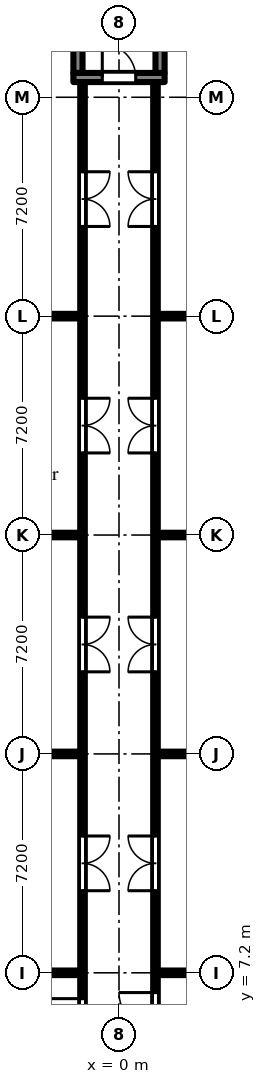
"""IFC4 building model, lengths in metres.
Left out: names, types, materials, properties, quantities, classifications, styles, units other than length and angle.
Written with IfcOpenShell. Run it as: python <this file> out.ifc"""

import sys

from ifc_helpers import new_model, si_unit, direction, frame, frame_2d, origin, place, context, subcontext, project, spatial, polyline, rectangle, outline, extrude, element, fill, save


model = new_model("IFC4")
c1 = context("Model", 3, precision=1e-05, world=origin(), true_north=direction((0.0, 1.0)))
c2 = subcontext(c1, "Body", "Model", "MODEL_VIEW")
j1 = project(units=[si_unit("LENGTHUNIT", "METRE"), si_unit("PLANEANGLEUNIT", "RADIAN")], contexts=[c1])
p1 = place(None, origin())
s1 = spatial("IfcSite", under=j1, at=p1, CompositionType="ELEMENT")
p2 = place(p1, origin())
s2 = spatial("IfcBuilding", under=s1, at=p2, CompositionType="ELEMENT")
p3 = place(p2, frame((0.0, 0.0, 62.7)))
s3 = spatial("IfcBuildingStorey", under=s2, at=p3, CompositionType="ELEMENT", Elevation=62.7)
p4 = place(p3, frame((-1.5, 36.65, 0.0), z_axis=(0.0, 0.0, 1.0), x_axis=(1.0, 0.0, 0.0)))
e1 = element("IfcWall", 1, at=p4, inside=s3, PredefinedType="SHEAR", context=c2, shape_type="SweptSolid", body=[
    extrude(rectangle(XDim=3.0, YDim=0.3, at=frame_2d((1.5, 0.0))), origin(), (0.0, 0.0, 1.0), 3.775),
])
p5 = place(p4, frame((0.95, 0.0, 0.0)))
e2 = element("IfcOpeningElement", 2, at=p5, cuts=e1, PredefinedType="OPENING", context=c2, shape_type="SweptSolid", body=[
    extrude(rectangle(XDim=1.1, YDim=2.1, at=frame_2d((0.55, 1.05))), frame((0.0, 0.16, 0.0), z_axis=(0.0, -1.0, 0.0), x_axis=(1.0, 0.0, 0.0)), (0.0, 0.0, 1.0), 0.32),
])
for number, where, z_axis, x_axis in (
    (3, (-1.35, 36.8, 0.0), (0.0, 0.0, 1.0), (0.0, 1.0, 0.0)),
    (4, (1.35, 36.8, 0.0), (0.0, 0.0, 1.0), (0.0, 1.0, 0.0)),
):
    element("IfcWall", number, at=place(p3, frame(where, z_axis=z_axis, x_axis=x_axis)), inside=s3, PredefinedType="SHEAR", context=c2, shape_type="SweptSolid", body=[
        extrude(rectangle(XDim=5.8, YDim=0.3, at=frame_2d((2.9, 0.0))), origin(), (0.0, 0.0, 1.0), 3.775),
    ])
p6 = place(p3, frame((-6.9, 21.6, 0.0), z_axis=(0.0, 0.0, 1.0), x_axis=(1.0, 0.0, 0.0)))
e5 = element("IfcWall", 5, at=p6, inside=s3, PredefinedType="PARTITIONING", context=c2, shape_type="SweptSolid", body=[
    extrude(rectangle(XDim=5.625, YDim=0.15, at=frame_2d((2.812, 0.0))), origin(), (0.0, 0.0, 1.0), 2.175),
])
p7 = place(p3, frame((-6.9, 28.8, 0.0), z_axis=(0.0, 0.0, 1.0), x_axis=(1.0, 0.0, 0.0)))
e6 = element("IfcWall", 6, at=p7, inside=s3, PredefinedType="PARTITIONING", context=c2, shape_type="SweptSolid", body=[
    extrude(rectangle(XDim=5.625, YDim=0.15, at=frame_2d((2.812, 0.0))), origin(), (0.0, 0.0, 1.0), 3.775),
])
p8 = place(p3, frame((-1.2, 1.125, 0.0), z_axis=(0.0, 0.0, 1.0), x_axis=(0.0, 1.0, 0.0)))
e7 = element("IfcWall", 7, at=p8, inside=s3, PredefinedType="PARTITIONING", context=c2, shape_type="SweptSolid", body=[
    extrude(outline(polyline([(0.0, 0.0), (35.375, 0.0), (35.375, 3.775), (22.877, 3.775), (22.875, 3.4), (22.075, 3.4), (22.073, 3.775), (0.0, 3.775), (0.0, 0.0)])), frame((0.0, 0.075, 0.0), z_axis=(0.0, -1.0, 0.0), x_axis=(1.0, 0.0, 0.0)), (0.0, 0.0, 1.0), 0.15),
])
p9 = place(p8, frame((4.025, 0.0, 0.0)))
e8 = element("IfcOpeningElement", 8, at=p9, cuts=e7, PredefinedType="OPENING", context=c2, shape_type="SweptSolid", body=[
    extrude(rectangle(XDim=1.2, YDim=2.1, at=frame_2d((0.6, 1.05))), frame((0.0, 0.085, 0.0), z_axis=(0.0, -1.0, 0.0), x_axis=(1.0, 0.0, 0.0)), (0.0, 0.0, 1.0), 0.17),
])
p10 = place(p8, frame((8.775, 0.0, 0.0)))
e9 = element("IfcOpeningElement", 9, at=p10, cuts=e7, PredefinedType="OPENING", context=c2, shape_type="SweptSolid", body=[
    extrude(rectangle(XDim=1.8, YDim=2.1, at=frame_2d((0.9, 1.05))), frame((0.0, 0.085, 0.0), z_axis=(0.0, -1.0, 0.0), x_axis=(1.0, 0.0, 0.0)), (0.0, 0.0, 1.0), 0.17),
])
p11 = place(p8, frame((15.975, 0.0, 0.0)))
e10 = element("IfcOpeningElement", 10, at=p11, cuts=e7, PredefinedType="OPENING", context=c2, shape_type="SweptSolid", body=[
    extrude(rectangle(XDim=1.8, YDim=2.1, at=frame_2d((0.9, 1.05))), frame((0.0, 0.085, 0.0), z_axis=(0.0, -1.0, 0.0), x_axis=(1.0, 0.0, 0.0)), (0.0, 0.0, 1.0), 0.17),
])
p12 = place(p8, frame((23.175, 0.0, 0.0)))
e11 = element("IfcOpeningElement", 11, at=p12, cuts=e7, PredefinedType="OPENING", context=c2, shape_type="SweptSolid", body=[
    extrude(rectangle(XDim=1.8, YDim=2.1, at=frame_2d((0.9, 1.05))), frame((0.0, 0.085, 0.0), z_axis=(0.0, -1.0, 0.0), x_axis=(1.0, 0.0, 0.0)), (0.0, 0.0, 1.0), 0.17),
])
p13 = place(p8, frame((30.625, 0.0, 0.0)))
e12 = element("IfcOpeningElement", 12, at=p13, cuts=e7, PredefinedType="OPENING", context=c2, shape_type="SweptSolid", body=[
    extrude(rectangle(XDim=1.8, YDim=2.1, at=frame_2d((0.9, 1.05))), frame((0.0, 0.085, 0.0), z_axis=(0.0, -1.0, 0.0), x_axis=(1.0, 0.0, 0.0)), (0.0, 0.0, 1.0), 0.17),
])
p14 = place(p3, frame((1.2, 1.125, 0.0), z_axis=(0.0, 0.0, 1.0), x_axis=(0.0, 1.0, 0.0)))
e13 = element("IfcWall", 13, at=p14, inside=s3, PredefinedType="PARTITIONING", context=c2, shape_type="SweptSolid", body=[
    extrude(outline(polyline([(0.0, 0.0), (35.375, 0.0), (35.375, 3.775), (22.877, 3.775), (22.875, 3.4), (22.075, 3.4), (22.073, 3.775), (0.0, 3.775), (0.0, 0.0)])), frame((0.0, 0.075, 0.0), z_axis=(0.0, -1.0, 0.0), x_axis=(1.0, 0.0, 0.0)), (0.0, 0.0, 1.0), 0.15),
])
p15 = place(p14, frame((0.175, 0.0, 0.0)))
e14 = element("IfcOpeningElement", 14, at=p15, cuts=e13, PredefinedType="OPENING", context=c2, shape_type="SweptSolid", body=[
    extrude(rectangle(XDim=0.9, YDim=2.1, at=frame_2d((0.45, 1.05))), frame((0.0, 0.085, 0.0), z_axis=(0.0, -1.0, 0.0), x_axis=(1.0, 0.0, 0.0)), (0.0, 0.0, 1.0), 0.17),
])
p16 = place(p14, frame((4.225, 0.0, 0.0)))
e15 = element("IfcOpeningElement", 15, at=p16, cuts=e13, PredefinedType="OPENING", context=c2, shape_type="SweptSolid", body=[
    extrude(rectangle(XDim=1.2, YDim=2.1, at=frame_2d((0.6, 1.05))), frame((0.0, 0.085, 0.0), z_axis=(0.0, -1.0, 0.0), x_axis=(1.0, 0.0, 0.0)), (0.0, 0.0, 1.0), 0.17),
])
p17 = place(p14, frame((8.775, 0.0, 0.0)))
e16 = element("IfcOpeningElement", 16, at=p17, cuts=e13, PredefinedType="OPENING", context=c2, shape_type="SweptSolid", body=[
    extrude(rectangle(XDim=1.8, YDim=2.1, at=frame_2d((0.9, 1.05))), frame((0.0, 0.085, 0.0), z_axis=(0.0, -1.0, 0.0), x_axis=(1.0, 0.0, 0.0)), (0.0, 0.0, 1.0), 0.17),
])
p18 = place(p14, frame((15.975, 0.0, 0.0)))
e17 = element("IfcOpeningElement", 17, at=p18, cuts=e13, PredefinedType="OPENING", context=c2, shape_type="SweptSolid", body=[
    extrude(rectangle(XDim=1.8, YDim=2.1, at=frame_2d((0.9, 1.05))), frame((0.0, 0.085, 0.0), z_axis=(0.0, -1.0, 0.0), x_axis=(1.0, 0.0, 0.0)), (0.0, 0.0, 1.0), 0.17),
])
p19 = place(p14, frame((23.175, 0.0, 0.0)))
e18 = element("IfcOpeningElement", 18, at=p19, cuts=e13, PredefinedType="OPENING", context=c2, shape_type="SweptSolid", body=[
    extrude(rectangle(XDim=1.8, YDim=2.1, at=frame_2d((0.9, 1.05))), frame((0.0, 0.085, 0.0), z_axis=(0.0, -1.0, 0.0), x_axis=(1.0, 0.0, 0.0)), (0.0, 0.0, 1.0), 0.17),
])
p20 = place(p14, frame((30.625, 0.0, 0.0)))
e19 = element("IfcOpeningElement", 19, at=p20, cuts=e13, PredefinedType="OPENING", context=c2, shape_type="SweptSolid", body=[
    extrude(rectangle(XDim=1.8, YDim=2.1, at=frame_2d((0.9, 1.05))), frame((0.0, 0.085, 0.0), z_axis=(0.0, -1.0, 0.0), x_axis=(1.0, 0.0, 0.0)), (0.0, 0.0, 1.0), 0.17),
])
for number, where, z_axis, x_axis in (
    (20, (1.275, 7.2, 0.0), (0.0, 0.0, 1.0), (1.0, 0.0, 0.0)),
    (21, (1.275, 14.4, 0.0), (0.0, 0.0, 1.0), (1.0, 0.0, 0.0)),
):
    element("IfcWall", number, at=place(p3, frame(where, z_axis=z_axis, x_axis=x_axis)), inside=s3, PredefinedType="PARTITIONING", context=c2, shape_type="SweptSolid", body=[
        extrude(rectangle(XDim=2.475, YDim=0.15, at=frame_2d((1.238, 0.0))), origin(), (0.0, 0.0, 1.0), 3.775),
    ])
p21 = place(p3, frame((1.275, 21.6, 0.0), z_axis=(0.0, 0.0, 1.0), x_axis=(1.0, 0.0, 0.0)))
e22 = element("IfcWall", 22, at=p21, inside=s3, PredefinedType="PARTITIONING", context=c2, shape_type="SweptSolid", body=[
    extrude(rectangle(XDim=5.625, YDim=0.15, at=frame_2d((2.812, 0.0))), origin(), (0.0, 0.0, 1.0), 2.175),
])
p22 = place(p3, frame((1.275, 28.8, 0.0), z_axis=(0.0, 0.0, 1.0), x_axis=(1.0, 0.0, 0.0)))
e23 = element("IfcWall", 23, at=p22, inside=s3, PredefinedType="PARTITIONING", context=c2, shape_type="SweptSolid", body=[
    extrude(rectangle(XDim=5.625, YDim=0.15, at=frame_2d((2.812, 0.0))), origin(), (0.0, 0.0, 1.0), 3.775),
])
for number, where, z_axis, x_axis in (
    (24, (-3.75, 7.2, 0.0), (0.0, 0.0, 1.0), (1.0, 0.0, 0.0)),
    (25, (-3.75, 14.4, 0.0), (0.0, 0.0, 1.0), (1.0, 0.0, 0.0)),
):
    element("IfcWall", number, at=place(p3, frame(where, z_axis=z_axis, x_axis=x_axis)), inside=s3, PredefinedType="PARTITIONING", context=c2, shape_type="SweptSolid", body=[
        extrude(rectangle(XDim=2.475, YDim=0.15, at=frame_2d((1.238, 0.0))), origin(), (0.0, 0.0, 1.0), 3.775),
    ])
p23 = place(p5, origin())
e26 = element("IfcDoor", 26, at=p23, inside=s3, OperationType="SINGLE_SWING_LEFT", PredefinedType="DOOR", context=c2, shape_type="SweptSolid", body=[
    extrude(rectangle(XDim=1.1, YDim=2.1, at=frame_2d((0.55, 1.05))), frame((0.0, 0.025, 0.0), z_axis=(0.0, -1.0, 0.0), x_axis=(1.0, 0.0, 0.0)), (0.0, 0.0, 1.0), 0.05),
])
fill(e2, e26)
p24 = place(p16, origin())
e27 = element("IfcDoor", 27, at=p24, inside=s3, OperationType="SINGLE_SWING_RIGHT", PredefinedType="DOOR", context=c2, shape_type="SweptSolid", body=[
    extrude(rectangle(XDim=1.2, YDim=2.1, at=frame_2d((0.6, 1.05))), frame((0.0, 0.025, 0.0), z_axis=(0.0, -1.0, 0.0), x_axis=(1.0, 0.0, 0.0)), (0.0, 0.0, 1.0), 0.05),
])
fill(e15, e27)
p25 = place(p9, origin())
e28 = element("IfcDoor", 28, at=p25, inside=s3, OperationType="SINGLE_SWING_RIGHT", PredefinedType="DOOR", context=c2, shape_type="SweptSolid", body=[
    extrude(rectangle(XDim=1.2, YDim=2.1, at=frame_2d((0.6, 1.05))), frame((0.0, 0.025, 0.0), z_axis=(0.0, -1.0, 0.0), x_axis=(1.0, 0.0, 0.0)), (0.0, 0.0, 1.0), 0.05),
])
fill(e8, e28)
p26 = place(p10, frame((1.8, 0.0, 0.0), z_axis=(0.0, 0.0, 1.0), x_axis=(-1.0, 0.0, 0.0)))
e29 = element("IfcDoor", 29, at=p26, inside=s3, OperationType="DOUBLE_DOOR_DOUBLE_SWING", PredefinedType="DOOR", context=c2, shape_type="SweptSolid", body=[
    extrude(rectangle(XDim=1.8, YDim=2.1, at=frame_2d((0.9, 1.05))), frame((0.0, 0.025, 0.0), z_axis=(0.0, -1.0, 0.0), x_axis=(1.0, 0.0, 0.0)), (0.0, 0.0, 1.0), 0.05),
])
fill(e9, e29)
p27 = place(p11, frame((1.8, 0.0, 0.0), z_axis=(0.0, 0.0, 1.0), x_axis=(-1.0, 0.0, 0.0)))
e30 = element("IfcDoor", 30, at=p27, inside=s3, OperationType="DOUBLE_DOOR_DOUBLE_SWING", PredefinedType="DOOR", context=c2, shape_type="SweptSolid", body=[
    extrude(rectangle(XDim=1.8, YDim=2.1, at=frame_2d((0.9, 1.05))), frame((0.0, 0.025, 0.0), z_axis=(0.0, -1.0, 0.0), x_axis=(1.0, 0.0, 0.0)), (0.0, 0.0, 1.0), 0.05),
])
fill(e10, e30)
p28 = place(p12, frame((1.8, 0.0, 0.0), z_axis=(0.0, 0.0, 1.0), x_axis=(-1.0, 0.0, 0.0)))
e31 = element("IfcDoor", 31, at=p28, inside=s3, OperationType="DOUBLE_DOOR_DOUBLE_SWING", PredefinedType="DOOR", context=c2, shape_type="SweptSolid", body=[
    extrude(rectangle(XDim=1.8, YDim=2.1, at=frame_2d((0.9, 1.05))), frame((0.0, 0.025, 0.0), z_axis=(0.0, -1.0, 0.0), x_axis=(1.0, 0.0, 0.0)), (0.0, 0.0, 1.0), 0.05),
])
fill(e11, e31)
p29 = place(p13, frame((1.8, 0.0, 0.0), z_axis=(0.0, 0.0, 1.0), x_axis=(-1.0, 0.0, 0.0)))
e32 = element("IfcDoor", 32, at=p29, inside=s3, OperationType="DOUBLE_DOOR_DOUBLE_SWING", PredefinedType="DOOR", context=c2, shape_type="SweptSolid", body=[
    extrude(rectangle(XDim=1.8, YDim=2.1, at=frame_2d((0.9, 1.05))), frame((0.0, 0.025, 0.0), z_axis=(0.0, -1.0, 0.0), x_axis=(1.0, 0.0, 0.0)), (0.0, 0.0, 1.0), 0.05),
])
fill(e12, e32)
p30 = place(p17, origin())
e33 = element("IfcDoor", 33, at=p30, inside=s3, OperationType="DOUBLE_DOOR_DOUBLE_SWING", PredefinedType="DOOR", context=c2, shape_type="SweptSolid", body=[
    extrude(rectangle(XDim=1.8, YDim=2.1, at=frame_2d((0.9, 1.05))), frame((0.0, 0.025, 0.0), z_axis=(0.0, -1.0, 0.0), x_axis=(1.0, 0.0, 0.0)), (0.0, 0.0, 1.0), 0.05),
])
fill(e16, e33)
p31 = place(p18, origin())
e34 = element("IfcDoor", 34, at=p31, inside=s3, OperationType="DOUBLE_DOOR_DOUBLE_SWING", PredefinedType="DOOR", context=c2, shape_type="SweptSolid", body=[
    extrude(rectangle(XDim=1.8, YDim=2.1, at=frame_2d((0.9, 1.05))), frame((0.0, 0.025, 0.0), z_axis=(0.0, -1.0, 0.0), x_axis=(1.0, 0.0, 0.0)), (0.0, 0.0, 1.0), 0.05),
])
fill(e17, e34)
p32 = place(p19, origin())
e35 = element("IfcDoor", 35, at=p32, inside=s3, OperationType="DOUBLE_DOOR_DOUBLE_SWING", PredefinedType="DOOR", context=c2, shape_type="SweptSolid", body=[
    extrude(rectangle(XDim=1.8, YDim=2.1, at=frame_2d((0.9, 1.05))), frame((0.0, 0.025, 0.0), z_axis=(0.0, -1.0, 0.0), x_axis=(1.0, 0.0, 0.0)), (0.0, 0.0, 1.0), 0.05),
])
fill(e18, e35)
p33 = place(p20, origin())
e36 = element("IfcDoor", 36, at=p33, inside=s3, OperationType="DOUBLE_DOOR_DOUBLE_SWING", PredefinedType="DOOR", context=c2, shape_type="SweptSolid", body=[
    extrude(rectangle(XDim=1.8, YDim=2.1, at=frame_2d((0.9, 1.05))), frame((0.0, 0.025, 0.0), z_axis=(0.0, -1.0, 0.0), x_axis=(1.0, 0.0, 0.0)), (0.0, 0.0, 1.0), 0.05),
])
fill(e19, e36)
save(model, sys.argv[1])
